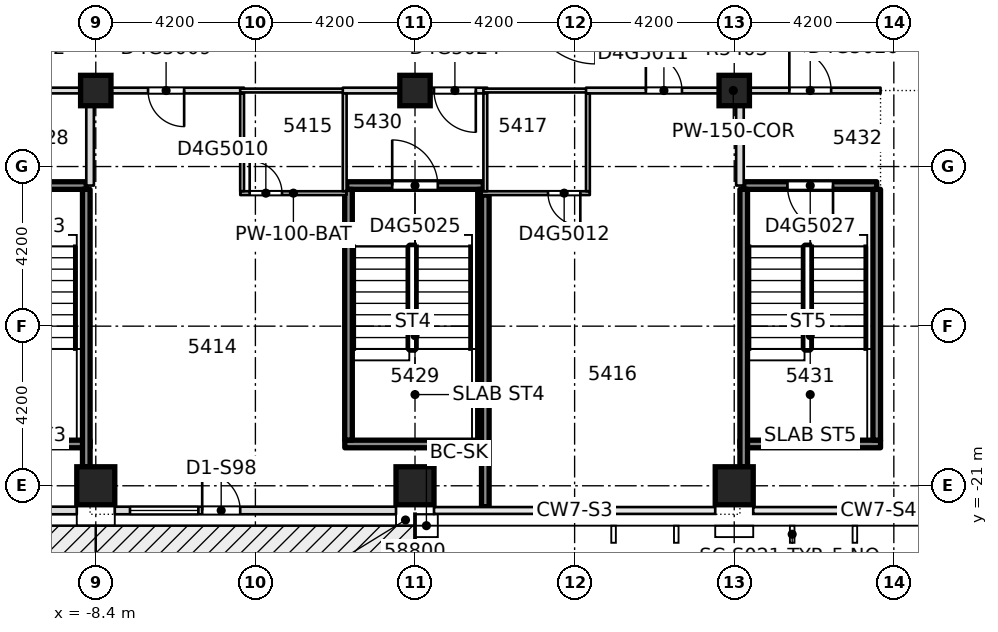
"""IFC4 building model, lengths in metres.
Left out: names, types, materials, properties, quantities, classifications, styles, units other than length and angle.
Written with IfcOpenShell. Run it as: python <this file> out.ifc"""

import sys

from ifc_helpers import new_model, si_unit, direction, frame, frame_2d, origin, origin_2d, place, context, subcontext, project, spatial, rectangle, extrude, element, fill, save


model = new_model("IFC4")
c1 = context("Model", 3, precision=1e-05, world=origin(), true_north=direction((0.0, 1.0)))
c2 = subcontext(c1, "Body", "Model", "MODEL_VIEW")
j1 = project(units=[si_unit("LENGTHUNIT", "METRE"), si_unit("PLANEANGLEUNIT", "RADIAN")], contexts=[c1])
p1 = place(None, origin())
s1 = spatial("IfcSite", under=j1, at=p1, CompositionType="ELEMENT")
p2 = place(p1, origin())
s2 = spatial("IfcBuilding", under=s1, at=p2, CompositionType="ELEMENT")
p3 = place(p2, frame((0.0, 0.0, 206.6)))
s3 = spatial("IfcBuildingStorey", under=s2, at=p3, CompositionType="ELEMENT", Elevation=206.6)
for number, where, z_axis, x_axis in (
    (1, (-8.4, -21.0, -0.4), (0.0, 0.0, 1.0), (1.0, 0.0, 0.0)),
    (2, (0.0, -21.0, -0.4), (0.0, 0.0, 1.0), (1.0, 0.0, 0.0)),
    (3, (8.4, -21.0, -0.4), (0.0, 0.0, 1.0), (1.0, 0.0, 0.0)),
):
    element("IfcColumn", number, at=place(p3, frame(where, z_axis=z_axis, x_axis=x_axis)), inside=s3, PredefinedType="COLUMN", context=c2, shape_type="SweptSolid", body=[
        extrude(rectangle(XDim=1.0, YDim=1.0, at=origin_2d()), origin(), (0.0, 0.0, 1.0), 3.45),
    ])
for number, where, z_axis, x_axis in (
    (4, (-8.4, -10.6, -0.4), (0.0, 0.0, 1.0), (1.0, 0.0, 0.0)),
    (5, (0.0, -10.6, -0.4), (0.0, 0.0, 1.0), (1.0, 0.0, 0.0)),
    (6, (8.4, -10.6, -0.4), (0.0, 0.0, 1.0), (1.0, 0.0, 0.0)),
):
    element("IfcColumn", number, at=place(p3, frame(where, z_axis=z_axis, x_axis=x_axis)), inside=s3, PredefinedType="COLUMN", context=c2, shape_type="SweptSolid", body=[
        extrude(rectangle(XDim=0.8, YDim=0.8, at=origin_2d()), origin(), (0.0, 0.0, 1.0), 3.45),
    ])
p4 = place(p3, frame((-1.848, -19.9, 0.0), z_axis=(0.0, 0.0, 1.0), x_axis=(1.0, 0.0, 0.0)))
e7 = element("IfcWall", 7, at=p4, inside=s3, PredefinedType="SOLIDWALL", context=c2, shape_type="SweptSolid", body=[
    extrude(rectangle(XDim=3.696, YDim=0.2, at=frame_2d((1.848, 0.0))), origin(), (0.0, 0.0, 1.0), 3.05),
])
p5 = place(p3, frame((-4.598, -13.3, 0.0), z_axis=(0.0, 0.0, 1.0), x_axis=(1.0, 0.0, 0.0)))
e8 = element("IfcWall", 8, at=p5, inside=s3, PredefinedType="PARTITIONING", context=c2, shape_type="SweptSolid", body=[
    extrude(rectangle(XDim=2.796, YDim=0.1, at=frame_2d((1.398, 0.0))), origin(), (0.0, 0.0, 1.0), 3.05),
])
p6 = place(p5, frame((0.248, 0.0, 0.0)))
e9 = element("IfcOpeningElement", 9, at=p6, cuts=e8, PredefinedType="OPENING", context=c2, shape_type="SweptSolid", body=[
    extrude(rectangle(XDim=0.85, YDim=2.1, at=frame_2d((0.425, 1.05))), frame((0.0, 0.06, 0.0), z_axis=(0.0, -1.0, 0.0), x_axis=(1.0, 0.0, 0.0)), (0.0, 0.0, 1.0), 0.12),
])
p7 = place(p3, frame((1.75, -13.3, 0.0), z_axis=(0.0, 0.0, 1.0), x_axis=(1.0, 0.0, 0.0)))
e10 = element("IfcWall", 10, at=p7, inside=s3, PredefinedType="PARTITIONING", context=c2, shape_type="SweptSolid", body=[
    extrude(rectangle(XDim=2.85, YDim=0.1, at=frame_2d((1.425, 0.0))), origin(), (0.0, 0.0, 1.0), 3.05),
])
p8 = place(p7, frame((1.75, 0.0, 0.0)))
e11 = element("IfcOpeningElement", 11, at=p8, cuts=e10, PredefinedType="OPENING", context=c2, shape_type="SweptSolid", body=[
    extrude(rectangle(XDim=0.85, YDim=2.1, at=frame_2d((0.425, 1.05))), frame((0.0, 0.06, 0.0), z_axis=(0.0, -1.0, 0.0), x_axis=(1.0, 0.0, 0.0)), (0.0, 0.0, 1.0), 0.12),
])
p9 = place(p3, frame((-12.15, -13.1, 0.0), z_axis=(0.0, 0.0, 1.0), x_axis=(1.0, 0.0, 0.0)))
e12 = element("IfcWall", 12, at=p9, inside=s3, PredefinedType="SOLIDWALL", context=c2, shape_type="SweptSolid", body=[
    extrude(rectangle(XDim=3.5, YDim=0.2, at=frame_2d((1.75, 0.0))), origin(), (0.0, 0.0, 1.0), 3.05),
])
p10 = place(p9, frame((1.15, 0.0, 0.0)))
e13 = element("IfcOpeningElement", 13, at=p10, cuts=e12, PredefinedType="OPENING", context=c2, shape_type="SweptSolid", body=[
    extrude(rectangle(XDim=1.2, YDim=2.1, at=frame_2d((0.6, 1.05))), frame((0.0, 0.11, 0.0), z_axis=(0.0, -1.0, 0.0), x_axis=(1.0, 0.0, 0.0)), (0.0, 0.0, 1.0), 0.22),
])
p11 = place(p3, frame((-1.798, -13.1, 0.0), z_axis=(0.0, 0.0, 1.0), x_axis=(1.0, 0.0, 0.0)))
e14 = element("IfcWall", 14, at=p11, inside=s3, PredefinedType="SOLIDWALL", context=c2, shape_type="SweptSolid", body=[
    extrude(rectangle(XDim=3.596, YDim=0.2, at=frame_2d((1.798, 0.0))), origin(), (0.0, 0.0, 1.0), 3.05),
])
p12 = place(p11, frame((1.198, 0.0, 0.0)))
e15 = element("IfcOpeningElement", 15, at=p12, cuts=e14, PredefinedType="OPENING", context=c2, shape_type="SweptSolid", body=[
    extrude(rectangle(XDim=1.2, YDim=2.1, at=frame_2d((0.6, 1.05))), frame((0.0, 0.11, 0.0), z_axis=(0.0, -1.0, 0.0), x_axis=(1.0, 0.0, 0.0)), (0.0, 0.0, 1.0), 0.22),
])
p13 = place(p3, frame((8.65, -13.1, 0.0), z_axis=(0.0, 0.0, 1.0), x_axis=(1.0, 0.0, 0.0)))
e16 = element("IfcWall", 16, at=p13, inside=s3, PredefinedType="SOLIDWALL", context=c2, shape_type="SweptSolid", body=[
    extrude(rectangle(XDim=3.5, YDim=0.2, at=frame_2d((1.75, 0.0))), origin(), (0.0, 0.0, 1.0), 3.05),
])
p14 = place(p13, frame((1.15, 0.0, 0.0)))
e17 = element("IfcOpeningElement", 17, at=p14, cuts=e16, PredefinedType="OPENING", context=c2, shape_type="SweptSolid", body=[
    extrude(rectangle(XDim=1.2, YDim=2.1, at=frame_2d((0.6, 1.05))), frame((0.0, 0.11, 0.0), z_axis=(0.0, -1.0, 0.0), x_axis=(1.0, 0.0, 0.0)), (0.0, 0.0, 1.0), 0.22),
])
p15 = place(p3, frame((-12.25, -10.6, 0.0), z_axis=(0.0, 0.0, 1.0), x_axis=(1.0, 0.0, 0.0)))
e18 = element("IfcWall", 18, at=p15, inside=s3, PredefinedType="PARTITIONING", context=c2, shape_type="SweptSolid", body=[
    extrude(rectangle(XDim=7.75, YDim=0.15, at=frame_2d((3.875, 0.0))), origin(), (0.0, 0.0, 1.0), 3.05),
])
p16 = place(p15, frame((5.225, 0.0, 0.0)))
e19 = element("IfcOpeningElement", 19, at=p16, cuts=e18, PredefinedType="OPENING", context=c2, shape_type="SweptSolid", body=[
    extrude(rectangle(XDim=0.95, YDim=2.1, at=frame_2d((0.475, 1.05))), frame((0.0, 0.085, 0.0), z_axis=(0.0, -1.0, 0.0), x_axis=(1.0, 0.0, 0.0)), (0.0, 0.0, 1.0), 0.17),
])
p17 = place(p15, frame((1.3, 0.0, 0.0)))
e20 = element("IfcOpeningElement", 20, at=p17, cuts=e18, PredefinedType="OPENING", context=c2, shape_type="SweptSolid", body=[
    extrude(rectangle(XDim=1.1, YDim=2.1, at=frame_2d((0.55, 1.05))), frame((0.0, 0.085, 0.0), z_axis=(0.0, -1.0, 0.0), x_axis=(1.0, 0.0, 0.0)), (0.0, 0.0, 1.0), 0.17),
])
p18 = place(p3, frame((-4.6, -10.6, 0.0), z_axis=(0.0, 0.0, 1.0), x_axis=(1.0, 0.0, 0.0)))
e21 = element("IfcWall", 21, at=p18, inside=s3, PredefinedType="PARTITIONING", context=c2, shape_type="SweptSolid", body=[
    extrude(rectangle(XDim=2.8, YDim=0.1, at=frame_2d((1.4, 0.0))), origin(), (0.0, 0.0, 1.0), 3.05),
])
p19 = place(p3, frame((-1.9, -10.6, 0.0), z_axis=(0.0, 0.0, 1.0), x_axis=(1.0, 0.0, 0.0)))
e22 = element("IfcWall", 22, at=p19, inside=s3, PredefinedType="PARTITIONING", context=c2, shape_type="SweptSolid", body=[
    extrude(rectangle(XDim=3.8, YDim=0.15, at=frame_2d((1.9, 0.0))), origin(), (0.0, 0.0, 1.0), 3.05),
])
p20 = place(p19, frame((2.4, 0.0, 0.0)))
e23 = element("IfcOpeningElement", 23, at=p20, cuts=e22, PredefinedType="OPENING", context=c2, shape_type="SweptSolid", body=[
    extrude(rectangle(XDim=1.1, YDim=2.1, at=frame_2d((0.55, 1.05))), frame((0.0, 0.085, 0.0), z_axis=(0.0, -1.0, 0.0), x_axis=(1.0, 0.0, 0.0)), (0.0, 0.0, 1.0), 0.17),
])
p21 = place(p3, frame((1.8, -10.6, 0.0), z_axis=(0.0, 0.0, 1.0), x_axis=(1.0, 0.0, 0.0)))
e24 = element("IfcWall", 24, at=p21, inside=s3, PredefinedType="PARTITIONING", context=c2, shape_type="SweptSolid", body=[
    extrude(rectangle(XDim=2.8, YDim=0.1, at=frame_2d((1.4, 0.0))), origin(), (0.0, 0.0, 1.0), 3.05),
])
p22 = place(p3, frame((4.5, -10.6, 0.0), z_axis=(0.0, 0.0, 1.0), x_axis=(1.0, 0.0, 0.0)))
e25 = element("IfcWall", 25, at=p22, inside=s3, PredefinedType="PARTITIONING", context=c2, shape_type="SweptSolid", body=[
    extrude(rectangle(XDim=7.75, YDim=0.15, at=frame_2d((3.875, 0.0))), origin(), (0.0, 0.0, 1.0), 3.05),
])
p23 = place(p22, frame((1.575, 0.0, 0.0)))
e26 = element("IfcOpeningElement", 26, at=p23, cuts=e25, PredefinedType="OPENING", context=c2, shape_type="SweptSolid", body=[
    extrude(rectangle(XDim=0.95, YDim=2.1, at=frame_2d((0.475, 1.05))), frame((0.0, 0.085, 0.0), z_axis=(0.0, -1.0, 0.0), x_axis=(1.0, 0.0, 0.0)), (0.0, 0.0, 1.0), 0.17),
])
p24 = place(p22, frame((5.35, 0.0, 0.0)))
e27 = element("IfcOpeningElement", 27, at=p24, cuts=e25, PredefinedType="OPENING", context=c2, shape_type="SweptSolid", body=[
    extrude(rectangle(XDim=1.1, YDim=2.1, at=frame_2d((0.55, 1.05))), frame((0.0, 0.085, 0.0), z_axis=(0.0, -1.0, 0.0), x_axis=(1.0, 0.0, 0.0)), (0.0, 0.0, 1.0), 0.17),
])
p25 = place(p3, frame((-8.55, -13.1, 0.0), z_axis=(0.0, 0.0, 1.0), x_axis=(0.0, 1.0, 0.0)))
e28 = element("IfcWall", 28, at=p25, inside=s3, PredefinedType="PARTITIONING", context=c2, shape_type="SweptSolid", body=[
    extrude(rectangle(XDim=2.425, YDim=0.2, at=frame_2d((1.212, 0.0))), origin(), (0.0, 0.0, 1.0), 3.05),
])
for number, where, z_axis, x_axis in (
    (29, (-4.55, -13.248, 0.0), (0.0, 0.0, 1.0), (0.0, 1.0, 0.0)),
    (30, (-1.85, -13.248, 0.0), (0.0, 0.0, 1.0), (0.0, 1.0, 0.0)),
):
    element("IfcWall", number, at=place(p3, frame(where, z_axis=z_axis, x_axis=x_axis)), inside=s3, PredefinedType="PARTITIONING", context=c2, shape_type="SweptSolid", body=[
        extrude(rectangle(XDim=2.573, YDim=0.1, at=frame_2d((1.287, 0.0))), origin(), (0.0, 0.0, 1.0), 3.05),
    ])
for number, where, z_axis, x_axis in (
    (31, (-1.75, -19.798, 0.0), (0.0, 0.0, 1.0), (0.0, 1.0, 0.0)),
    (32, (1.75, -19.798, 0.0), (0.0, 0.0, 1.0), (0.0, 1.0, 0.0)),
):
    element("IfcWall", number, at=place(p3, frame(where, z_axis=z_axis, x_axis=x_axis)), inside=s3, PredefinedType="SOLIDWALL", context=c2, shape_type="SweptSolid", body=[
        extrude(rectangle(XDim=6.596, YDim=0.2, at=frame_2d((3.298, 0.0))), origin(), (0.0, 0.0, 1.0), 3.05),
    ])
for number, where, z_axis, x_axis in (
    (33, (1.85, -13.25, 0.0), (0.0, 0.0, 1.0), (0.0, 1.0, 0.0)),
    (34, (4.55, -13.25, 0.0), (0.0, 0.0, 1.0), (0.0, 1.0, 0.0)),
):
    element("IfcWall", number, at=place(p3, frame(where, z_axis=z_axis, x_axis=x_axis)), inside=s3, PredefinedType="PARTITIONING", context=c2, shape_type="SweptSolid", body=[
        extrude(rectangle(XDim=2.575, YDim=0.1, at=frame_2d((1.288, 0.0))), origin(), (0.0, 0.0, 1.0), 3.05),
    ])
p26 = place(p3, frame((8.55, -13.1, 0.0), z_axis=(0.0, 0.0, 1.0), x_axis=(0.0, 1.0, 0.0)))
e35 = element("IfcWall", 35, at=p26, inside=s3, PredefinedType="PARTITIONING", context=c2, shape_type="SweptSolid", body=[
    extrude(rectangle(XDim=2.425, YDim=0.2, at=frame_2d((1.212, 0.0))), origin(), (0.0, 0.0, 1.0), 3.05),
])
p27 = place(p3, frame((-15.5, -21.65, 0.0), z_axis=(0.0, 0.0, 1.0), x_axis=(1.0, 0.0, 0.0)))
e36 = element("IfcWall", 36, at=p27, inside=s3, PredefinedType="STANDARD", context=c2, shape_type="SweptSolid", body=[
    extrude(rectangle(XDim=6.6, YDim=0.2, at=frame_2d((3.3, 0.0))), origin(), (0.0, 0.0, 1.0), 3.05),
])
p28 = place(p27, frame((0.95, 0.0, 0.0)))
e37 = element("IfcOpeningElement", 37, at=p28, cuts=e36, PredefinedType="OPENING", context=c2, shape_type="SweptSolid", body=[
    extrude(rectangle(XDim=1.0, YDim=2.4, at=frame_2d((0.5, 1.2))), frame((0.0, 0.11, 0.0), z_axis=(0.0, -1.0, 0.0), x_axis=(1.0, 0.0, 0.0)), (0.0, 0.0, 1.0), 0.22),
])
p29 = place(p3, frame((-7.9, -21.65, 0.0), z_axis=(0.0, 0.0, 1.0), x_axis=(1.0, 0.0, 0.0)))
e38 = element("IfcWall", 38, at=p29, inside=s3, PredefinedType="STANDARD", context=c2, shape_type="SweptSolid", body=[
    extrude(rectangle(XDim=7.4, YDim=0.2, at=frame_2d((3.7, 0.0))), origin(), (0.0, 0.0, 1.0), 3.05),
])
p30 = place(p29, frame((0.4, 0.0, 0.2)))
e39 = element("IfcOpeningElement", 39, at=p30, cuts=e38, PredefinedType="OPENING", context=c2, shape_type="SweptSolid", body=[
    extrude(rectangle(XDim=1.8, YDim=2.65, at=frame_2d((0.9, 1.325))), frame((0.0, 0.11, 0.0), z_axis=(0.0, -1.0, 0.0), x_axis=(1.0, 0.0, 0.0)), (0.0, 0.0, 1.0), 0.22),
])
p31 = place(p29, frame((2.3, 0.0, 0.0)))
e40 = element("IfcOpeningElement", 40, at=p31, cuts=e38, PredefinedType="OPENING", context=c2, shape_type="SweptSolid", body=[
    extrude(rectangle(XDim=1.0, YDim=2.4, at=frame_2d((0.5, 1.2))), frame((0.0, 0.11, 0.0), z_axis=(0.0, -1.0, 0.0), x_axis=(1.0, 0.0, 0.0)), (0.0, 0.0, 1.0), 0.22),
])
for number, where, z_axis, x_axis in (
    (41, (-12.25, -19.9, 0.0), (0.0, 0.0, 1.0), (1.0, 0.0, 0.0)),
    (42, (8.55, -19.9, 0.0), (0.0, 0.0, 1.0), (1.0, 0.0, 0.0)),
):
    element("IfcWall", number, at=place(p3, frame(where, z_axis=z_axis, x_axis=x_axis)), inside=s3, PredefinedType="SOLIDWALL", context=c2, shape_type="SweptSolid", body=[
        extrude(rectangle(XDim=3.7, YDim=0.2, at=frame_2d((1.85, 0.0))), origin(), (0.0, 0.0, 1.0), 3.05),
    ])
p32 = place(p3, frame((8.65, -20.5, 0.0), z_axis=(0.0, 0.0, 1.0), x_axis=(0.0, 1.0, 0.0)))
e43 = element("IfcWall", 43, at=p32, inside=s3, PredefinedType="SOLIDWALL", context=c2, shape_type="SweptSolid", body=[
    extrude(rectangle(XDim=7.3, YDim=0.2, at=frame_2d((3.65, 0.0))), origin(), (0.0, 0.0, 1.0), 3.05),
])
p33 = place(p3, frame((12.15, -19.8, 0.0), z_axis=(0.0, 0.0, 1.0), x_axis=(0.0, 1.0, 0.0)))
e44 = element("IfcWall", 44, at=p33, inside=s3, PredefinedType="SOLIDWALL", context=c2, shape_type="SweptSolid", body=[
    extrude(rectangle(XDim=6.6, YDim=0.2, at=frame_2d((3.3, 0.0))), origin(), (0.0, 0.0, 1.0), 3.05),
])
p34 = place(p3, frame((-8.65, -20.5, 0.0), z_axis=(0.0, 0.0, 1.0), x_axis=(0.0, 1.0, 0.0)))
e45 = element("IfcWall", 45, at=p34, inside=s3, PredefinedType="SOLIDWALL", context=c2, shape_type="SweptSolid", body=[
    extrude(rectangle(XDim=7.3, YDim=0.2, at=frame_2d((3.65, 0.0))), origin(), (0.0, 0.0, 1.0), 3.05),
])
p35 = place(p3, frame((1.85, -21.55, 0.0), z_axis=(0.0, 0.0, 1.0), x_axis=(0.0, 1.0, 0.0)))
e46 = element("IfcWall", 46, at=p35, inside=s3, PredefinedType="SOLIDWALL", context=c2, shape_type="SweptSolid", body=[
    extrude(rectangle(XDim=8.2, YDim=0.2, at=frame_2d((4.1, 0.0))), origin(), (0.0, 0.0, 1.0), 3.05),
])
p36 = place(p16, origin())
e47 = element("IfcDoor", 47, at=p36, inside=s3, OperationType="SINGLE_SWING_LEFT", PredefinedType="DOOR", context=c2, shape_type="SweptSolid", body=[
    extrude(rectangle(XDim=0.95, YDim=2.1, at=frame_2d((0.475, 1.05))), frame((0.0, 0.025, 0.0), z_axis=(0.0, -1.0, 0.0), x_axis=(1.0, 0.0, 0.0)), (0.0, 0.0, 1.0), 0.05),
])
fill(e19, e47)
p37 = place(p6, origin())
e48 = element("IfcDoor", 48, at=p37, inside=s3, OperationType="SINGLE_SWING_LEFT", PredefinedType="DOOR", context=c2, shape_type="SweptSolid", body=[
    extrude(rectangle(XDim=0.85, YDim=2.1, at=frame_2d((0.425, 1.05))), frame((0.0, 0.025, 0.0), z_axis=(0.0, -1.0, 0.0), x_axis=(1.0, 0.0, 0.0)), (0.0, 0.0, 1.0), 0.05),
])
fill(e9, e48)
p38 = place(p23, origin())
e49 = element("IfcDoor", 49, at=p38, inside=s3, OperationType="SINGLE_SWING_LEFT", PredefinedType="DOOR", context=c2, shape_type="SweptSolid", body=[
    extrude(rectangle(XDim=0.95, YDim=2.1, at=frame_2d((0.475, 1.05))), frame((0.0, 0.025, 0.0), z_axis=(0.0, -1.0, 0.0), x_axis=(1.0, 0.0, 0.0)), (0.0, 0.0, 1.0), 0.05),
])
fill(e26, e49)
p39 = place(p8, origin())
e50 = element("IfcDoor", 50, at=p39, inside=s3, OperationType="SINGLE_SWING_RIGHT", PredefinedType="DOOR", context=c2, shape_type="SweptSolid", body=[
    extrude(rectangle(XDim=0.85, YDim=2.1, at=frame_2d((0.425, 1.05))), frame((0.0, 0.025, 0.0), z_axis=(0.0, -1.0, 0.0), x_axis=(1.0, 0.0, 0.0)), (0.0, 0.0, 1.0), 0.05),
])
fill(e11, e50)
p40 = place(p20, origin())
e51 = element("IfcDoor", 51, at=p40, inside=s3, OperationType="SINGLE_SWING_LEFT", PredefinedType="DOOR", context=c2, shape_type="SweptSolid", body=[
    extrude(rectangle(XDim=1.1, YDim=2.1, at=frame_2d((0.55, 1.05))), frame((0.0, 0.025, 0.0), z_axis=(0.0, -1.0, 0.0), x_axis=(1.0, 0.0, 0.0)), (0.0, 0.0, 1.0), 0.05),
])
fill(e23, e51)
p41 = place(p12, origin())
e52 = element("IfcDoor", 52, at=p41, inside=s3, OperationType="SINGLE_SWING_RIGHT", PredefinedType="DOOR", context=c2, shape_type="SweptSolid", body=[
    extrude(rectangle(XDim=1.2, YDim=2.1, at=frame_2d((0.6, 1.05))), frame((0.0, 0.025, 0.0), z_axis=(0.0, -1.0, 0.0), x_axis=(1.0, 0.0, 0.0)), (0.0, 0.0, 1.0), 0.05),
])
fill(e15, e52)
p42 = place(p24, origin())
e53 = element("IfcDoor", 53, at=p42, inside=s3, OperationType="SINGLE_SWING_LEFT", PredefinedType="DOOR", context=c2, shape_type="SweptSolid", body=[
    extrude(rectangle(XDim=1.1, YDim=2.1, at=frame_2d((0.55, 1.05))), frame((0.0, 0.025, 0.0), z_axis=(0.0, -1.0, 0.0), x_axis=(1.0, 0.0, 0.0)), (0.0, 0.0, 1.0), 0.05),
])
fill(e27, e53)
p43 = place(p14, origin())
e54 = element("IfcDoor", 54, at=p43, inside=s3, OperationType="SINGLE_SWING_RIGHT", PredefinedType="DOOR", context=c2, shape_type="SweptSolid", body=[
    extrude(rectangle(XDim=1.2, YDim=2.1, at=frame_2d((0.6, 1.05))), frame((0.0, 0.025, 0.0), z_axis=(0.0, -1.0, 0.0), x_axis=(1.0, 0.0, 0.0)), (0.0, 0.0, 1.0), 0.05),
])
fill(e17, e54)
p44 = place(p30, origin())
e55 = element("IfcWindow", 55, at=p44, inside=s3, PartitioningType="SINGLE_PANEL", PredefinedType="WINDOW", context=c2, shape_type="SweptSolid", body=[
    extrude(rectangle(XDim=1.8, YDim=2.65, at=frame_2d((0.9, 1.325))), frame((0.0, 0.03, 0.0), z_axis=(0.0, -1.0, 0.0), x_axis=(1.0, 0.0, 0.0)), (0.0, 0.0, 1.0), 0.06),
])
fill(e39, e55)
p45 = place(p31, origin())
e56 = element("IfcDoor", 56, at=p45, inside=s3, OperationType="SINGLE_SWING_LEFT", PredefinedType="DOOR", context=c2, shape_type="SweptSolid", body=[
    extrude(rectangle(XDim=1.0, YDim=2.4, at=frame_2d((0.5, 1.2))), frame((0.0, 0.025, 0.0), z_axis=(0.0, -1.0, 0.0), x_axis=(1.0, 0.0, 0.0)), (0.0, 0.0, 1.0), 0.05),
])
fill(e40, e56)
save(model, sys.argv[1])
